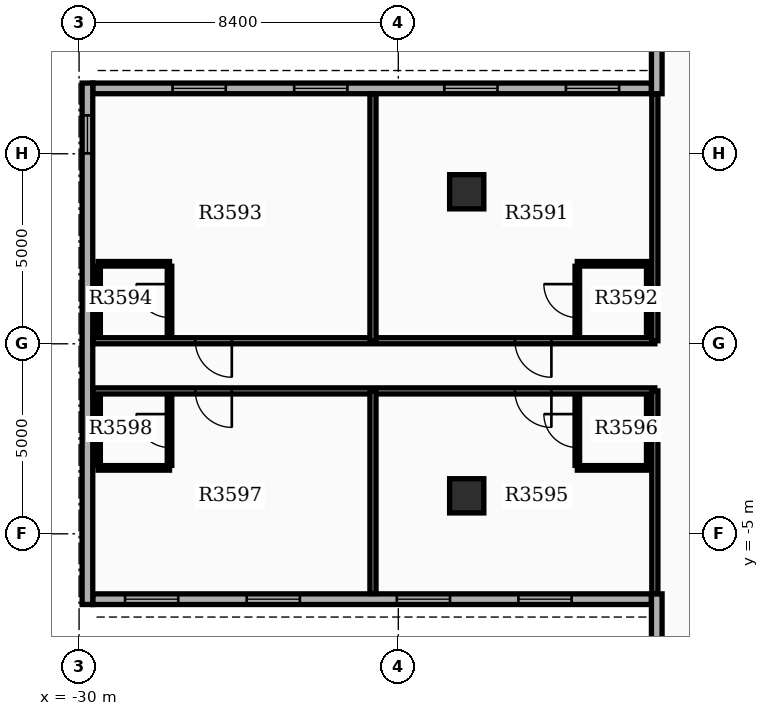
"""IFC4 building model, lengths in metres.
Left out: names, types, materials, properties, quantities, classifications, styles, units other than length and angle.
Written with IfcOpenShell. Run it as: python <this file> out.ifc"""

import sys

from ifc_helpers import new_model, si_unit, direction, frame, frame_2d, origin, origin_2d, place, context, subcontext, project, spatial, rectangle, extrude, element, fill, save


model = new_model("IFC4")
c1 = context("Model", 3, precision=1e-05, world=origin(), true_north=direction((0.0, 1.0)))
c2 = subcontext(c1, "Body", "Model", "MODEL_VIEW")
j1 = project(units=[si_unit("LENGTHUNIT", "METRE"), si_unit("PLANEANGLEUNIT", "RADIAN")], contexts=[c1])
p1 = place(None, origin())
s1 = spatial("IfcSite", under=j1, at=p1, CompositionType="ELEMENT")
p2 = place(p1, origin())
s2 = spatial("IfcBuilding", under=s1, at=p2, CompositionType="ELEMENT")
p3 = place(p2, frame((0.0, 0.0, 224.7)))
s3 = spatial("IfcBuildingStorey", under=s2, at=p3, CompositionType="ELEMENT", Elevation=224.7)
for number, where, z_axis, x_axis in (
    (1, (-19.8, -4.0, 0.0), (0.0, 0.0, 1.0), (1.0, 0.0, 0.0)),
    (2, (-19.8, 4.0, 0.0), (0.0, 0.0, 1.0), (1.0, 0.0, 0.0)),
):
    element("IfcColumn", number, at=place(p3, frame(where, z_axis=z_axis, x_axis=x_axis)), inside=s3, PredefinedType="COLUMN", context=c2, shape_type="SweptSolid", body=[
        extrude(rectangle(XDim=0.9, YDim=0.9, at=origin_2d()), origin(), (0.0, 0.0, 1.0), 3.9),
    ])
p4 = place(p3, frame((-14.94, 6.72, 0.0), z_axis=(0.0, 0.0, 1.0), x_axis=(-1.0, 0.0, 0.0)))
e3 = element("IfcWall", 3, at=p4, inside=s3, PredefinedType="STANDARD", context=c2, shape_type="SweptSolid", body=[
    extrude(rectangle(XDim=14.7, YDim=0.28, at=frame_2d((7.35, 0.0))), origin(), (0.0, 0.0, 1.0), 3.18),
])
p5 = place(p4, frame((0.85, 0.0, 0.8)))
e4 = element("IfcOpeningElement", 4, at=p5, cuts=e3, PredefinedType="OPENING", context=c2, shape_type="SweptSolid", body=[
    extrude(rectangle(XDim=1.4, YDim=1.6, at=frame_2d((0.7, 0.8))), frame((0.0, 0.15, 0.0), z_axis=(0.0, -1.0, 0.0), x_axis=(1.0, 0.0, 0.0)), (0.0, 0.0, 1.0), 0.3),
])
p6 = place(p4, frame((4.05, 0.0, 0.8)))
e5 = element("IfcOpeningElement", 5, at=p6, cuts=e3, PredefinedType="OPENING", context=c2, shape_type="SweptSolid", body=[
    extrude(rectangle(XDim=1.4, YDim=1.6, at=frame_2d((0.7, 0.8))), frame((0.0, 0.15, 0.0), z_axis=(0.0, -1.0, 0.0), x_axis=(1.0, 0.0, 0.0)), (0.0, 0.0, 1.0), 0.3),
])
p7 = place(p4, frame((8.0, 0.0, 0.8)))
e6 = element("IfcOpeningElement", 6, at=p7, cuts=e3, PredefinedType="OPENING", context=c2, shape_type="SweptSolid", body=[
    extrude(rectangle(XDim=1.4, YDim=1.6, at=frame_2d((0.7, 0.8))), frame((0.0, 0.15, 0.0), z_axis=(0.0, -1.0, 0.0), x_axis=(1.0, 0.0, 0.0)), (0.0, 0.0, 1.0), 0.3),
])
p8 = place(p4, frame((11.2, 0.0, 0.8)))
e7 = element("IfcOpeningElement", 7, at=p8, cuts=e3, PredefinedType="OPENING", context=c2, shape_type="SweptSolid", body=[
    extrude(rectangle(XDim=1.4, YDim=1.6, at=frame_2d((0.7, 0.8))), frame((0.0, 0.15, 0.0), z_axis=(0.0, -1.0, 0.0), x_axis=(1.0, 0.0, 0.0)), (0.0, 0.0, 1.0), 0.3),
])
p9 = place(p3, frame((-29.64, -6.72, 0.0), z_axis=(0.0, 0.0, 1.0), x_axis=(1.0, 0.0, 0.0)))
e8 = element("IfcWall", 8, at=p9, inside=s3, PredefinedType="STANDARD", context=c2, shape_type="SweptSolid", body=[
    extrude(rectangle(XDim=14.7, YDim=0.28, at=frame_2d((7.35, 0.0))), origin(), (0.0, 0.0, 1.0), 3.18),
])
p10 = place(p9, frame((0.85, 0.0, 0.8)))
e9 = element("IfcOpeningElement", 9, at=p10, cuts=e8, PredefinedType="OPENING", context=c2, shape_type="SweptSolid", body=[
    extrude(rectangle(XDim=1.4, YDim=1.6, at=frame_2d((0.7, 0.8))), frame((0.0, 0.15, 0.0), z_axis=(0.0, -1.0, 0.0), x_axis=(1.0, 0.0, 0.0)), (0.0, 0.0, 1.0), 0.3),
])
p11 = place(p9, frame((4.05, 0.0, 0.8)))
e10 = element("IfcOpeningElement", 10, at=p11, cuts=e8, PredefinedType="OPENING", context=c2, shape_type="SweptSolid", body=[
    extrude(rectangle(XDim=1.4, YDim=1.6, at=frame_2d((0.7, 0.8))), frame((0.0, 0.15, 0.0), z_axis=(0.0, -1.0, 0.0), x_axis=(1.0, 0.0, 0.0)), (0.0, 0.0, 1.0), 0.3),
])
p12 = place(p9, frame((8.0, 0.0, 0.8)))
e11 = element("IfcOpeningElement", 11, at=p12, cuts=e8, PredefinedType="OPENING", context=c2, shape_type="SweptSolid", body=[
    extrude(rectangle(XDim=1.4, YDim=1.6, at=frame_2d((0.7, 0.8))), frame((0.0, 0.15, 0.0), z_axis=(0.0, -1.0, 0.0), x_axis=(1.0, 0.0, 0.0)), (0.0, 0.0, 1.0), 0.3),
])
p13 = place(p9, frame((11.2, 0.0, 0.8)))
e12 = element("IfcOpeningElement", 12, at=p13, cuts=e8, PredefinedType="OPENING", context=c2, shape_type="SweptSolid", body=[
    extrude(rectangle(XDim=1.4, YDim=1.6, at=frame_2d((0.7, 0.8))), frame((0.0, 0.15, 0.0), z_axis=(0.0, -1.0, 0.0), x_axis=(1.0, 0.0, 0.0)), (0.0, 0.0, 1.0), 0.3),
])
p14 = place(p3, frame((-29.78, 6.86, 0.0), z_axis=(0.0, 0.0, 1.0), x_axis=(0.0, -1.0, 0.0)))
e13 = element("IfcWall", 13, at=p14, inside=s3, PredefinedType="STANDARD", context=c2, shape_type="SweptSolid", body=[
    extrude(rectangle(XDim=13.72, YDim=0.28, at=frame_2d((6.86, 0.0))), origin(), (0.0, 0.0, 1.0), 3.18),
])
p15 = place(p14, frame((0.85, 0.0, 0.85)))
e14 = element("IfcOpeningElement", 14, at=p15, cuts=e13, PredefinedType="OPENING", context=c2, shape_type="SweptSolid", body=[
    extrude(rectangle(XDim=1.0, YDim=1.5, at=frame_2d((0.5, 0.75))), frame((0.0, 0.15, 0.0), z_axis=(0.0, -1.0, 0.0), x_axis=(1.0, 0.0, 0.0)), (0.0, 0.0, 1.0), 0.3),
])
for number, where, z_axis, x_axis in (
    (15, (-14.8, 6.58, 0.0), (0.0, 0.0, 1.0), (0.0, 1.0, 0.0)),
    (16, (-14.8, -6.58, 0.0), (0.0, 0.0, 1.0), (0.0, -1.0, 0.0)),
):
    element("IfcWall", number, at=place(p3, frame(where, z_axis=z_axis, x_axis=x_axis)), inside=s3, PredefinedType="STANDARD", context=c2, shape_type="SweptSolid", body=[
        extrude(rectangle(XDim=6.86, YDim=0.28, at=frame_2d((3.43, 0.0))), origin(), (0.0, 0.0, 1.0), 3.18),
    ])
p16 = place(p3, frame((-14.85, 0.08, 0.0), z_axis=(0.0, 0.0, 1.0), x_axis=(-1.0, 0.0, 0.0)))
e17 = element("IfcWall", 17, at=p16, inside=s3, PredefinedType="PARTITIONING", context=c2, shape_type="SweptSolid", body=[
    extrude(rectangle(XDim=14.782, YDim=0.16, at=frame_2d((7.391, 0.0))), origin(), (0.0, 0.0, 1.0), 3.17),
])
p17 = place(p16, frame((2.722, 0.0, 0.0)))
e18 = element("IfcOpeningElement", 18, at=p17, cuts=e17, PredefinedType="OPENING", context=c2, shape_type="SweptSolid", body=[
    extrude(rectangle(XDim=0.96, YDim=2.15, at=frame_2d((0.48, 1.075))), frame((0.0, 0.09, 0.0), z_axis=(0.0, -1.0, 0.0), x_axis=(1.0, 0.0, 0.0)), (0.0, 0.0, 1.0), 0.18),
])
p18 = place(p16, frame((11.131, 0.0, 0.0)))
e19 = element("IfcOpeningElement", 19, at=p18, cuts=e17, PredefinedType="OPENING", context=c2, shape_type="SweptSolid", body=[
    extrude(rectangle(XDim=0.96, YDim=2.15, at=frame_2d((0.48, 1.075))), frame((0.0, 0.09, 0.0), z_axis=(0.0, -1.0, 0.0), x_axis=(1.0, 0.0, 0.0)), (0.0, 0.0, 1.0), 0.18),
])
for number, where, z_axis, x_axis in (
    (20, (-14.85, 0.08, 0.0), (0.0, 0.0, 1.0), (0.0, 1.0, 0.0)),
    (21, (-22.267, 0.08, 0.0), (0.0, 0.0, 1.0), (0.0, 1.0, 0.0)),
):
    element("IfcWall", number, at=place(p3, frame(where, z_axis=z_axis, x_axis=x_axis)), inside=s3, PredefinedType="PARTITIONING", context=c2, shape_type="SweptSolid", body=[
        extrude(rectangle(XDim=6.492, YDim=0.16, at=frame_2d((3.246, 0.0))), origin(), (0.0, 0.0, 1.0), 3.17),
    ])
p19 = place(p3, frame((-16.89, 0.22, 0.0), z_axis=(0.0, 0.0, 1.0), x_axis=(0.0, 1.0, 0.0)))
e22 = element("IfcWall", 22, at=p19, inside=s3, PredefinedType="PARTITIONING", context=c2, shape_type="SweptSolid", body=[
    extrude(rectangle(XDim=1.82, YDim=0.12, at=frame_2d((0.91, 0.0))), origin(), (0.0, 0.0, 1.0), 3.17),
])
p20 = place(p19, frame((0.47, 0.0, 0.0)))
e23 = element("IfcOpeningElement", 23, at=p20, cuts=e22, PredefinedType="OPENING", context=c2, shape_type="SweptSolid", body=[
    extrude(rectangle(XDim=0.88, YDim=2.1, at=frame_2d((0.44, 1.05))), frame((0.0, 0.07, 0.0), z_axis=(0.0, -1.0, 0.0), x_axis=(1.0, 0.0, 0.0)), (0.0, 0.0, 1.0), 0.14),
])
p21 = place(p3, frame((-15.01, 0.22, 0.0), z_axis=(0.0, 0.0, 1.0), x_axis=(0.0, 1.0, 0.0)))
e24 = element("IfcWall", 24, at=p21, inside=s3, PredefinedType="PARTITIONING", context=c2, shape_type="SweptSolid", body=[
    extrude(rectangle(XDim=1.82, YDim=0.12, at=frame_2d((0.91, 0.0))), origin(), (0.0, 0.0, 1.0), 3.17),
])
p22 = place(p3, frame((-15.01, 2.105, 0.0), z_axis=(0.0, 0.0, 1.0), x_axis=(-1.0, 0.0, 0.0)))
e25 = element("IfcWall", 25, at=p22, inside=s3, PredefinedType="PARTITIONING", context=c2, shape_type="SweptSolid", body=[
    extrude(rectangle(XDim=1.88, YDim=0.12, at=frame_2d((0.94, 0.0))), origin(), (0.0, 0.0, 1.0), 3.17),
])
p23 = place(p3, frame((-27.62, 0.22, 0.0), z_axis=(0.0, 0.0, 1.0), x_axis=(0.0, 1.0, 0.0)))
e26 = element("IfcWall", 26, at=p23, inside=s3, PredefinedType="PARTITIONING", context=c2, shape_type="SweptSolid", body=[
    extrude(rectangle(XDim=1.82, YDim=0.12, at=frame_2d((0.91, 0.0))), origin(), (0.0, 0.0, 1.0), 3.17),
])
p24 = place(p23, frame((0.47, 0.0, 0.0)))
e27 = element("IfcOpeningElement", 27, at=p24, cuts=e26, PredefinedType="OPENING", context=c2, shape_type="SweptSolid", body=[
    extrude(rectangle(XDim=0.88, YDim=2.1, at=frame_2d((0.44, 1.05))), frame((0.0, 0.07, 0.0), z_axis=(0.0, -1.0, 0.0), x_axis=(1.0, 0.0, 0.0)), (0.0, 0.0, 1.0), 0.14),
])
p25 = place(p3, frame((-29.5, 0.22, 0.0), z_axis=(0.0, 0.0, 1.0), x_axis=(0.0, 1.0, 0.0)))
e28 = element("IfcWall", 28, at=p25, inside=s3, PredefinedType="PARTITIONING", context=c2, shape_type="SweptSolid", body=[
    extrude(rectangle(XDim=1.82, YDim=0.12, at=frame_2d((0.91, 0.0))), origin(), (0.0, 0.0, 1.0), 3.17),
])
p26 = place(p3, frame((-27.62, 2.105, 0.0), z_axis=(0.0, 0.0, 1.0), x_axis=(-1.0, 0.0, 0.0)))
e29 = element("IfcWall", 29, at=p26, inside=s3, PredefinedType="PARTITIONING", context=c2, shape_type="SweptSolid", body=[
    extrude(rectangle(XDim=1.88, YDim=0.12, at=frame_2d((0.94, 0.0))), origin(), (0.0, 0.0, 1.0), 3.17),
])
p27 = place(p3, frame((-14.85, -1.24, 0.0), z_axis=(0.0, 0.0, 1.0), x_axis=(-1.0, 0.0, 0.0)))
e30 = element("IfcWall", 30, at=p27, inside=s3, PredefinedType="PARTITIONING", context=c2, shape_type="SweptSolid", body=[
    extrude(rectangle(XDim=14.782, YDim=0.16, at=frame_2d((7.391, 0.0))), origin(), (0.0, 0.0, 1.0), 3.17),
])
p28 = place(p27, frame((2.722, 0.0, 0.0)))
e31 = element("IfcOpeningElement", 31, at=p28, cuts=e30, PredefinedType="OPENING", context=c2, shape_type="SweptSolid", body=[
    extrude(rectangle(XDim=0.96, YDim=2.15, at=frame_2d((0.48, 1.075))), frame((0.0, 0.09, 0.0), z_axis=(0.0, -1.0, 0.0), x_axis=(1.0, 0.0, 0.0)), (0.0, 0.0, 1.0), 0.18),
])
p29 = place(p27, frame((11.131, 0.0, 0.0)))
e32 = element("IfcOpeningElement", 32, at=p29, cuts=e30, PredefinedType="OPENING", context=c2, shape_type="SweptSolid", body=[
    extrude(rectangle(XDim=0.96, YDim=2.15, at=frame_2d((0.48, 1.075))), frame((0.0, 0.09, 0.0), z_axis=(0.0, -1.0, 0.0), x_axis=(1.0, 0.0, 0.0)), (0.0, 0.0, 1.0), 0.18),
])
for number, where, z_axis, x_axis in (
    (33, (-14.85, -1.24, 0.0), (0.0, 0.0, 1.0), (0.0, -1.0, 0.0)),
    (34, (-22.267, -1.24, 0.0), (0.0, 0.0, 1.0), (0.0, -1.0, 0.0)),
):
    element("IfcWall", number, at=place(p3, frame(where, z_axis=z_axis, x_axis=x_axis)), inside=s3, PredefinedType="PARTITIONING", context=c2, shape_type="SweptSolid", body=[
        extrude(rectangle(XDim=5.332, YDim=0.16, at=frame_2d((2.666, 0.0))), origin(), (0.0, 0.0, 1.0), 3.17),
    ])
p30 = place(p3, frame((-16.89, -3.2, 0.0), z_axis=(0.0, 0.0, 1.0), x_axis=(0.0, 1.0, 0.0)))
e35 = element("IfcWall", 35, at=p30, inside=s3, PredefinedType="PARTITIONING", context=c2, shape_type="SweptSolid", body=[
    extrude(rectangle(XDim=1.82, YDim=0.12, at=frame_2d((0.91, 0.0))), origin(), (0.0, 0.0, 1.0), 3.17),
])
p31 = place(p30, frame((0.47, 0.0, 0.0)))
e36 = element("IfcOpeningElement", 36, at=p31, cuts=e35, PredefinedType="OPENING", context=c2, shape_type="SweptSolid", body=[
    extrude(rectangle(XDim=0.88, YDim=2.1, at=frame_2d((0.44, 1.05))), frame((0.0, 0.07, 0.0), z_axis=(0.0, -1.0, 0.0), x_axis=(1.0, 0.0, 0.0)), (0.0, 0.0, 1.0), 0.14),
])
p32 = place(p3, frame((-15.01, -3.2, 0.0), z_axis=(0.0, 0.0, 1.0), x_axis=(0.0, 1.0, 0.0)))
e37 = element("IfcWall", 37, at=p32, inside=s3, PredefinedType="PARTITIONING", context=c2, shape_type="SweptSolid", body=[
    extrude(rectangle(XDim=1.82, YDim=0.12, at=frame_2d((0.91, 0.0))), origin(), (0.0, 0.0, 1.0), 3.17),
])
p33 = place(p3, frame((-15.01, -3.265, 0.0), z_axis=(0.0, 0.0, 1.0), x_axis=(-1.0, 0.0, 0.0)))
e38 = element("IfcWall", 38, at=p33, inside=s3, PredefinedType="PARTITIONING", context=c2, shape_type="SweptSolid", body=[
    extrude(rectangle(XDim=1.88, YDim=0.12, at=frame_2d((0.94, 0.0))), origin(), (0.0, 0.0, 1.0), 3.17),
])
p34 = place(p3, frame((-27.62, -3.2, 0.0), z_axis=(0.0, 0.0, 1.0), x_axis=(0.0, 1.0, 0.0)))
e39 = element("IfcWall", 39, at=p34, inside=s3, PredefinedType="PARTITIONING", context=c2, shape_type="SweptSolid", body=[
    extrude(rectangle(XDim=1.82, YDim=0.12, at=frame_2d((0.91, 0.0))), origin(), (0.0, 0.0, 1.0), 3.17),
])
p35 = place(p34, frame((0.47, 0.0, 0.0)))
e40 = element("IfcOpeningElement", 40, at=p35, cuts=e39, PredefinedType="OPENING", context=c2, shape_type="SweptSolid", body=[
    extrude(rectangle(XDim=0.88, YDim=2.1, at=frame_2d((0.44, 1.05))), frame((0.0, 0.07, 0.0), z_axis=(0.0, -1.0, 0.0), x_axis=(1.0, 0.0, 0.0)), (0.0, 0.0, 1.0), 0.14),
])
p36 = place(p3, frame((-29.5, -3.2, 0.0), z_axis=(0.0, 0.0, 1.0), x_axis=(0.0, 1.0, 0.0)))
e41 = element("IfcWall", 41, at=p36, inside=s3, PredefinedType="PARTITIONING", context=c2, shape_type="SweptSolid", body=[
    extrude(rectangle(XDim=1.82, YDim=0.12, at=frame_2d((0.91, 0.0))), origin(), (0.0, 0.0, 1.0), 3.17),
])
p37 = place(p3, frame((-27.62, -3.265, 0.0), z_axis=(0.0, 0.0, 1.0), x_axis=(-1.0, 0.0, 0.0)))
e42 = element("IfcWall", 42, at=p37, inside=s3, PredefinedType="PARTITIONING", context=c2, shape_type="SweptSolid", body=[
    extrude(rectangle(XDim=1.88, YDim=0.12, at=frame_2d((0.94, 0.0))), origin(), (0.0, 0.0, 1.0), 3.17),
])
p38 = place(p5, origin())
e43 = element("IfcWindow", 43, at=p38, inside=s3, PartitioningType="SINGLE_PANEL", PredefinedType="WINDOW", context=c2, shape_type="SweptSolid", body=[
    extrude(rectangle(XDim=1.4, YDim=1.6, at=frame_2d((0.7, 0.8))), frame((0.0, 0.03, 0.0), z_axis=(0.0, -1.0, 0.0), x_axis=(1.0, 0.0, 0.0)), (0.0, 0.0, 1.0), 0.06),
])
fill(e4, e43)
p39 = place(p6, origin())
e44 = element("IfcWindow", 44, at=p39, inside=s3, PartitioningType="SINGLE_PANEL", PredefinedType="WINDOW", context=c2, shape_type="SweptSolid", body=[
    extrude(rectangle(XDim=1.4, YDim=1.6, at=frame_2d((0.7, 0.8))), frame((0.0, 0.03, 0.0), z_axis=(0.0, -1.0, 0.0), x_axis=(1.0, 0.0, 0.0)), (0.0, 0.0, 1.0), 0.06),
])
fill(e5, e44)
p40 = place(p7, origin())
e45 = element("IfcWindow", 45, at=p40, inside=s3, PartitioningType="SINGLE_PANEL", PredefinedType="WINDOW", context=c2, shape_type="SweptSolid", body=[
    extrude(rectangle(XDim=1.4, YDim=1.6, at=frame_2d((0.7, 0.8))), frame((0.0, 0.03, 0.0), z_axis=(0.0, -1.0, 0.0), x_axis=(1.0, 0.0, 0.0)), (0.0, 0.0, 1.0), 0.06),
])
fill(e6, e45)
p41 = place(p8, origin())
e46 = element("IfcWindow", 46, at=p41, inside=s3, PartitioningType="SINGLE_PANEL", PredefinedType="WINDOW", context=c2, shape_type="SweptSolid", body=[
    extrude(rectangle(XDim=1.4, YDim=1.6, at=frame_2d((0.7, 0.8))), frame((0.0, 0.03, 0.0), z_axis=(0.0, -1.0, 0.0), x_axis=(1.0, 0.0, 0.0)), (0.0, 0.0, 1.0), 0.06),
])
fill(e7, e46)
p42 = place(p10, origin())
e47 = element("IfcWindow", 47, at=p42, inside=s3, PartitioningType="SINGLE_PANEL", PredefinedType="WINDOW", context=c2, shape_type="SweptSolid", body=[
    extrude(rectangle(XDim=1.4, YDim=1.6, at=frame_2d((0.7, 0.8))), frame((0.0, 0.03, 0.0), z_axis=(0.0, -1.0, 0.0), x_axis=(1.0, 0.0, 0.0)), (0.0, 0.0, 1.0), 0.06),
])
fill(e9, e47)
p43 = place(p11, origin())
e48 = element("IfcWindow", 48, at=p43, inside=s3, PartitioningType="SINGLE_PANEL", PredefinedType="WINDOW", context=c2, shape_type="SweptSolid", body=[
    extrude(rectangle(XDim=1.4, YDim=1.6, at=frame_2d((0.7, 0.8))), frame((0.0, 0.03, 0.0), z_axis=(0.0, -1.0, 0.0), x_axis=(1.0, 0.0, 0.0)), (0.0, 0.0, 1.0), 0.06),
])
fill(e10, e48)
p44 = place(p12, origin())
e49 = element("IfcWindow", 49, at=p44, inside=s3, PartitioningType="SINGLE_PANEL", PredefinedType="WINDOW", context=c2, shape_type="SweptSolid", body=[
    extrude(rectangle(XDim=1.4, YDim=1.6, at=frame_2d((0.7, 0.8))), frame((0.0, 0.03, 0.0), z_axis=(0.0, -1.0, 0.0), x_axis=(1.0, 0.0, 0.0)), (0.0, 0.0, 1.0), 0.06),
])
fill(e11, e49)
p45 = place(p13, origin())
e50 = element("IfcWindow", 50, at=p45, inside=s3, PartitioningType="SINGLE_PANEL", PredefinedType="WINDOW", context=c2, shape_type="SweptSolid", body=[
    extrude(rectangle(XDim=1.4, YDim=1.6, at=frame_2d((0.7, 0.8))), frame((0.0, 0.03, 0.0), z_axis=(0.0, -1.0, 0.0), x_axis=(1.0, 0.0, 0.0)), (0.0, 0.0, 1.0), 0.06),
])
fill(e12, e50)
p46 = place(p15, origin())
e51 = element("IfcWindow", 51, at=p46, inside=s3, PartitioningType="SINGLE_PANEL", PredefinedType="WINDOW", context=c2, shape_type="SweptSolid", body=[
    extrude(rectangle(XDim=1.0, YDim=1.5, at=frame_2d((0.5, 0.75))), frame((0.0, 0.03, 0.0), z_axis=(0.0, -1.0, 0.0), x_axis=(1.0, 0.0, 0.0)), (0.0, 0.0, 1.0), 0.06),
])
fill(e14, e51)
p47 = place(p17, origin())
e52 = element("IfcDoor", 52, at=p47, inside=s3, OperationType="SINGLE_SWING_LEFT", PredefinedType="DOOR", context=c2, shape_type="SweptSolid", body=[
    extrude(rectangle(XDim=0.96, YDim=2.15, at=frame_2d((0.48, 1.075))), frame((0.0, 0.025, 0.0), z_axis=(0.0, -1.0, 0.0), x_axis=(1.0, 0.0, 0.0)), (0.0, 0.0, 1.0), 0.05),
])
fill(e18, e52)
p48 = place(p20, origin())
e53 = element("IfcDoor", 53, at=p48, inside=s3, OperationType="SINGLE_SWING_RIGHT", PredefinedType="DOOR", context=c2, shape_type="SweptSolid", body=[
    extrude(rectangle(XDim=0.88, YDim=2.1, at=frame_2d((0.44, 1.05))), frame((0.0, 0.025, 0.0), z_axis=(0.0, -1.0, 0.0), x_axis=(1.0, 0.0, 0.0)), (0.0, 0.0, 1.0), 0.05),
])
fill(e23, e53)
p49 = place(p18, origin())
e54 = element("IfcDoor", 54, at=p49, inside=s3, OperationType="SINGLE_SWING_LEFT", PredefinedType="DOOR", context=c2, shape_type="SweptSolid", body=[
    extrude(rectangle(XDim=0.96, YDim=2.15, at=frame_2d((0.48, 1.075))), frame((0.0, 0.025, 0.0), z_axis=(0.0, -1.0, 0.0), x_axis=(1.0, 0.0, 0.0)), (0.0, 0.0, 1.0), 0.05),
])
fill(e19, e54)
p50 = place(p24, origin())
e55 = element("IfcDoor", 55, at=p50, inside=s3, OperationType="SINGLE_SWING_RIGHT", PredefinedType="DOOR", context=c2, shape_type="SweptSolid", body=[
    extrude(rectangle(XDim=0.88, YDim=2.1, at=frame_2d((0.44, 1.05))), frame((0.0, 0.025, 0.0), z_axis=(0.0, -1.0, 0.0), x_axis=(1.0, 0.0, 0.0)), (0.0, 0.0, 1.0), 0.05),
])
fill(e27, e55)
p51 = place(p28, origin())
e56 = element("IfcDoor", 56, at=p51, inside=s3, OperationType="SINGLE_SWING_LEFT", PredefinedType="DOOR", context=c2, shape_type="SweptSolid", body=[
    extrude(rectangle(XDim=0.96, YDim=2.15, at=frame_2d((0.48, 1.075))), frame((0.0, 0.025, 0.0), z_axis=(0.0, -1.0, 0.0), x_axis=(1.0, 0.0, 0.0)), (0.0, 0.0, 1.0), 0.05),
])
fill(e31, e56)
p52 = place(p31, origin())
e57 = element("IfcDoor", 57, at=p52, inside=s3, OperationType="SINGLE_SWING_RIGHT", PredefinedType="DOOR", context=c2, shape_type="SweptSolid", body=[
    extrude(rectangle(XDim=0.88, YDim=2.1, at=frame_2d((0.44, 1.05))), frame((0.0, 0.025, 0.0), z_axis=(0.0, -1.0, 0.0), x_axis=(1.0, 0.0, 0.0)), (0.0, 0.0, 1.0), 0.05),
])
fill(e36, e57)
p53 = place(p29, origin())
e58 = element("IfcDoor", 58, at=p53, inside=s3, OperationType="SINGLE_SWING_LEFT", PredefinedType="DOOR", context=c2, shape_type="SweptSolid", body=[
    extrude(rectangle(XDim=0.96, YDim=2.15, at=frame_2d((0.48, 1.075))), frame((0.0, 0.025, 0.0), z_axis=(0.0, -1.0, 0.0), x_axis=(1.0, 0.0, 0.0)), (0.0, 0.0, 1.0), 0.05),
])
fill(e32, e58)
p54 = place(p35, origin())
e59 = element("IfcDoor", 59, at=p54, inside=s3, OperationType="SINGLE_SWING_RIGHT", PredefinedType="DOOR", context=c2, shape_type="SweptSolid", body=[
    extrude(rectangle(XDim=0.88, YDim=2.1, at=frame_2d((0.44, 1.05))), frame((0.0, 0.025, 0.0), z_axis=(0.0, -1.0, 0.0), x_axis=(1.0, 0.0, 0.0)), (0.0, 0.0, 1.0), 0.05),
])
fill(e40, e59)
save(model, sys.argv[1])
